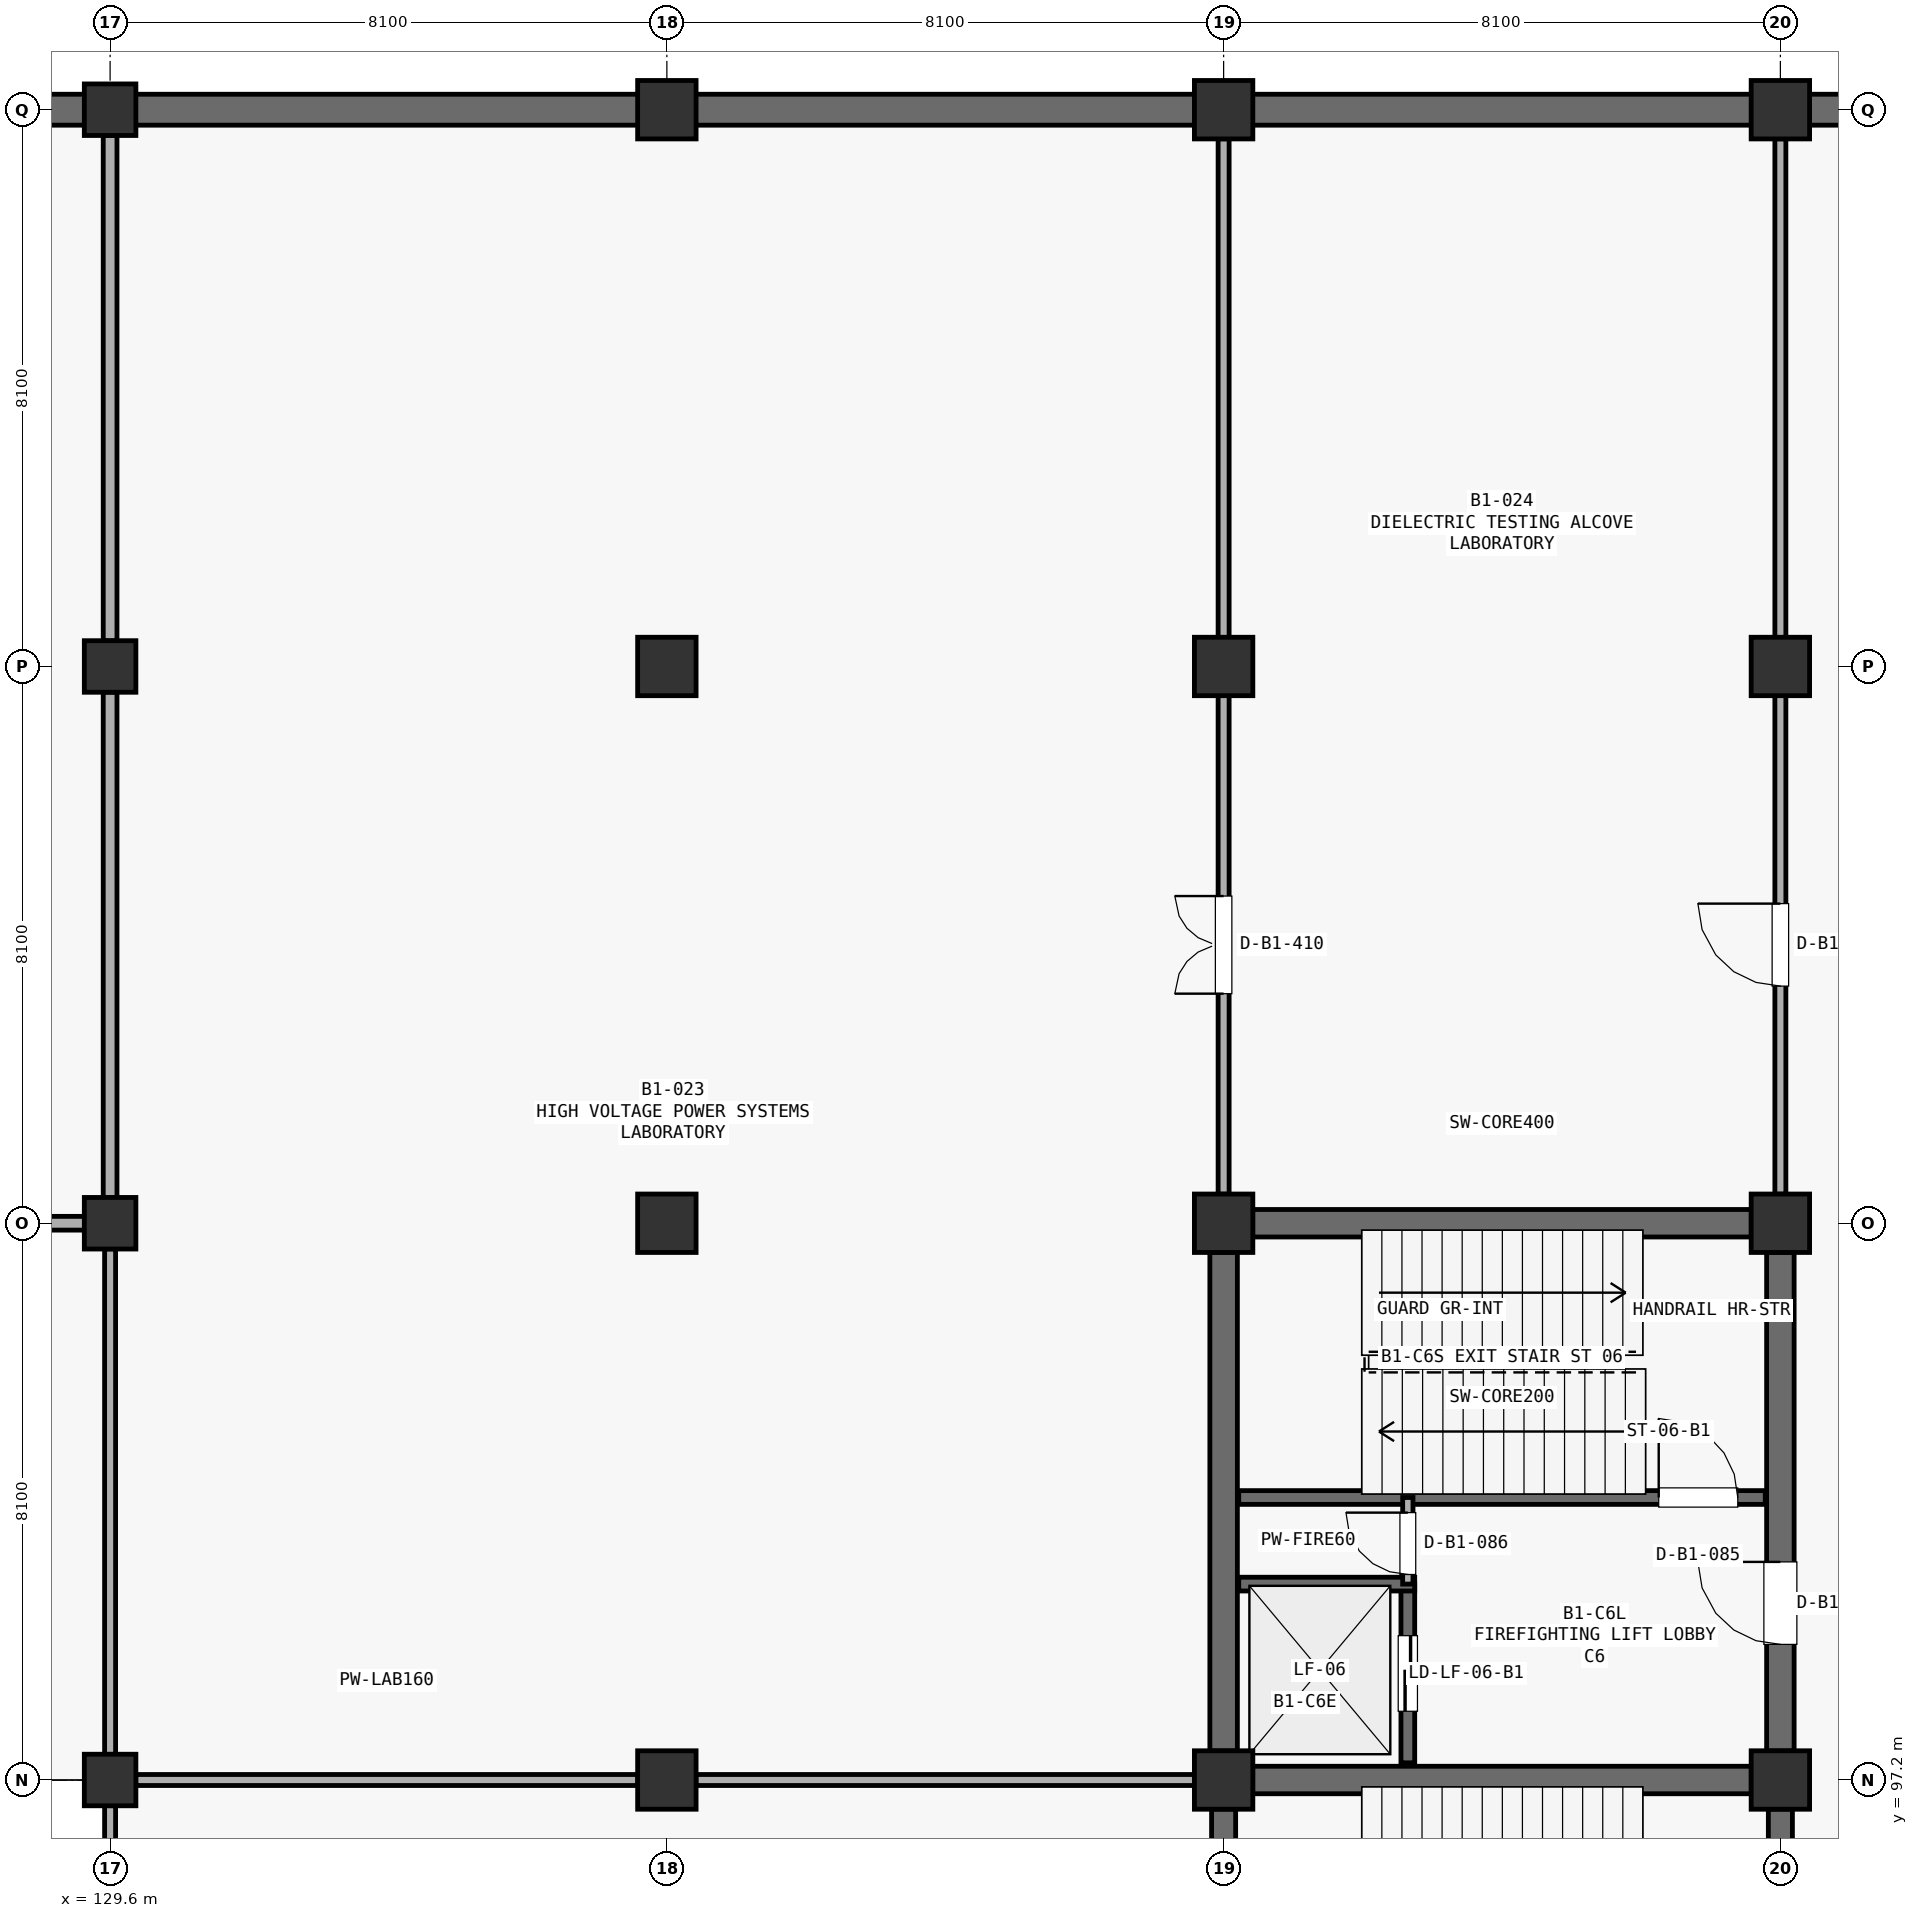
"""IFC4 building model, lengths in metres.
Left out: names, types, materials, properties, quantities, classifications, styles, units other than length and angle.
Written with IfcOpenShell. Run it as: python <this file> out.ifc"""

import sys

from ifc_helpers import new_model, si_unit, direction, frame, frame_2d, origin, origin_2d, place, context, subcontext, project, spatial, rectangle, extrude, element, fill, save


model = new_model("IFC4")
c1 = context("Model", 3, precision=1e-05, world=origin(), true_north=direction((0.0, 1.0)))
c2 = subcontext(c1, "Body", "Model", "MODEL_VIEW")
j1 = project(units=[si_unit("LENGTHUNIT", "METRE"), si_unit("PLANEANGLEUNIT", "RADIAN")], contexts=[c1])
p1 = place(None, origin())
s1 = spatial("IfcSite", under=j1, at=p1, CompositionType="ELEMENT")
p2 = place(p1, origin())
s2 = spatial("IfcBuilding", under=s1, at=p2, CompositionType="ELEMENT")
p3 = place(p2, frame((0.0, 0.0, -5.1)))
s3 = spatial("IfcBuildingStorey", under=s2, at=p3, CompositionType="ELEMENT", Elevation=-5.1)
for number, where, z_axis, x_axis in (
    (1, (129.6, 97.2, 0.0), (0.0, 0.0, 1.0), (1.0, 0.0, 0.0)),
    (2, (129.6, 105.3, 0.0), (0.0, 0.0, 1.0), (1.0, 0.0, 0.0)),
    (3, (129.6, 113.4, 0.0), (0.0, 0.0, 1.0), (1.0, 0.0, 0.0)),
    (4, (129.6, 121.5, 0.0), (0.0, 0.0, 1.0), (1.0, 0.0, 0.0)),
):
    element("IfcColumn", number, at=place(p3, frame(where, z_axis=z_axis, x_axis=x_axis)), inside=s3, PredefinedType="COLUMN", context=c2, shape_type="SweptSolid", body=[
        extrude(rectangle(XDim=0.75, YDim=0.75, at=origin_2d()), origin(), (0.0, 0.0, 1.0), 5.1),
    ])
for number, where, z_axis, x_axis in (
    (5, (137.7, 97.2, 0.0), (0.0, 0.0, 1.0), (1.0, 0.0, 0.0)),
    (6, (137.7, 105.3, 0.0), (0.0, 0.0, 1.0), (1.0, 0.0, 0.0)),
    (7, (137.7, 113.4, 0.0), (0.0, 0.0, 1.0), (1.0, 0.0, 0.0)),
    (8, (137.7, 121.5, 0.0), (0.0, 0.0, 1.0), (1.0, 0.0, 0.0)),
    (9, (145.8, 97.2, 0.0), (0.0, 0.0, 1.0), (1.0, 0.0, 0.0)),
    (10, (145.8, 105.3, 0.0), (0.0, 0.0, 1.0), (1.0, 0.0, 0.0)),
    (11, (145.8, 113.4, 0.0), (0.0, 0.0, 1.0), (1.0, 0.0, 0.0)),
    (12, (145.8, 121.5, 0.0), (0.0, 0.0, 1.0), (1.0, 0.0, 0.0)),
    (13, (153.9, 97.2, 0.0), (0.0, 0.0, 1.0), (1.0, 0.0, 0.0)),
    (14, (153.9, 105.3, 0.0), (0.0, 0.0, 1.0), (1.0, 0.0, 0.0)),
    (15, (153.9, 113.4, 0.0), (0.0, 0.0, 1.0), (1.0, 0.0, 0.0)),
    (16, (153.9, 121.5, 0.0), (0.0, 0.0, 1.0), (1.0, 0.0, 0.0)),
):
    element("IfcColumn", number, at=place(p3, frame(where, z_axis=z_axis, x_axis=x_axis)), inside=s3, PredefinedType="COLUMN", context=c2, shape_type="SweptSolid", body=[
        extrude(rectangle(XDim=0.85, YDim=0.85, at=origin_2d()), origin(), (0.0, 0.0, 1.0), 5.1),
    ])
p4 = place(p3, frame((121.86, 121.5, 0.0), z_axis=(0.0, 0.0, 1.0), x_axis=(1.0, 0.0, 0.0)))
e17 = element("IfcWall", 17, at=p4, inside=s3, PredefinedType="SOLIDWALL", context=c2, shape_type="SweptSolid", body=[
    extrude(rectangle(XDim=7.38, YDim=0.45, at=frame_2d((3.69, 0.0))), origin(), (0.0, 0.0, 1.0), 4.13),
])
p5 = place(p3, frame((129.96, 121.5, 0.0), z_axis=(0.0, 0.0, 1.0), x_axis=(1.0, 0.0, 0.0)))
e18 = element("IfcWall", 18, at=p5, inside=s3, PredefinedType="SOLIDWALL", context=c2, shape_type="SweptSolid", body=[
    extrude(rectangle(XDim=7.33, YDim=0.45, at=frame_2d((3.665, 0.0))), origin(), (0.0, 0.0, 1.0), 4.13),
])
p6 = place(p3, frame((138.11, 121.5, 0.0), z_axis=(0.0, 0.0, 1.0), x_axis=(1.0, 0.0, 0.0)))
e19 = element("IfcWall", 19, at=p6, inside=s3, PredefinedType="SOLIDWALL", context=c2, shape_type="SweptSolid", body=[
    extrude(rectangle(XDim=7.28, YDim=0.45, at=frame_2d((3.64, 0.0))), origin(), (0.0, 0.0, 1.0), 4.18),
])
p7 = place(p3, frame((146.21, 121.5, 0.0), z_axis=(0.0, 0.0, 1.0), x_axis=(1.0, 0.0, 0.0)))
e20 = element("IfcWall", 20, at=p7, inside=s3, PredefinedType="SOLIDWALL", context=c2, shape_type="SweptSolid", body=[
    extrude(rectangle(XDim=7.28, YDim=0.45, at=frame_2d((3.64, 0.0))), origin(), (0.0, 0.0, 1.0), 4.13),
])
p8 = place(p3, frame((154.31, 121.5, 0.0), z_axis=(0.0, 0.0, 1.0), x_axis=(1.0, 0.0, 0.0)))
e21 = element("IfcWall", 21, at=p8, inside=s3, PredefinedType="SOLIDWALL", context=c2, shape_type="SweptSolid", body=[
    extrude(rectangle(XDim=7.28, YDim=0.45, at=frame_2d((3.64, 0.0))), origin(), (0.0, 0.0, 1.0), 3.83),
])
p9 = place(p3, frame((146.223, 105.3, 0.0), z_axis=(0.0, 0.0, 1.0), x_axis=(1.0, 0.0, 0.0)))
e22 = element("IfcWall", 22, at=p9, inside=s3, PredefinedType="SHEAR", context=c2, shape_type="SweptSolid", body=[
    extrude(rectangle(XDim=7.254, YDim=0.4, at=frame_2d((3.627, 0.0))), origin(), (0.0, 0.0, 1.0), 4.782),
])
p10 = place(p3, frame((145.8, 97.623, 0.0), z_axis=(0.0, 0.0, 1.0), x_axis=(0.0, 1.0, 0.0)))
e23 = element("IfcWall", 23, at=p10, inside=s3, PredefinedType="SHEAR", context=c2, shape_type="SweptSolid", body=[
    extrude(rectangle(XDim=7.254, YDim=0.4, at=frame_2d((3.627, 0.0))), origin(), (0.0, 0.0, 1.0), 4.782),
])
p11 = place(p3, frame((153.9, 97.623, 0.0), z_axis=(0.0, 0.0, 1.0), x_axis=(0.0, 1.0, 0.0)))
e24 = element("IfcWall", 24, at=p11, inside=s3, PredefinedType="SHEAR", context=c2, shape_type="SweptSolid", body=[
    extrude(rectangle(XDim=7.254, YDim=0.4, at=frame_2d((3.627, 0.0))), origin(), (0.0, 0.0, 1.0), 4.782),
])
p12 = place(p11, frame((1.55, 0.0, 0.0)))
e25 = element("IfcOpeningElement", 25, at=p12, cuts=e24, PredefinedType="OPENING", context=c2, shape_type="SweptSolid", body=[
    extrude(rectangle(XDim=1.2, YDim=2.2, at=frame_2d((0.6, 1.1))), frame((0.0, 0.21, 0.0), z_axis=(0.0, -1.0, 0.0), x_axis=(1.0, 0.0, 0.0)), (0.0, 0.0, 1.0), 0.42),
])
p13 = place(p3, frame((146.223, 97.2, 0.0), z_axis=(0.0, 0.0, 1.0), x_axis=(1.0, 0.0, 0.0)))
e26 = element("IfcWall", 26, at=p13, inside=s3, PredefinedType="SHEAR", context=c2, shape_type="SweptSolid", body=[
    extrude(rectangle(XDim=7.254, YDim=0.4, at=frame_2d((3.627, 0.0))), origin(), (0.0, 0.0, 1.0), 4.782),
])
p14 = place(p3, frame((146.02, 101.31, 0.0), z_axis=(0.0, 0.0, 1.0), x_axis=(1.0, 0.0, 0.0)))
e27 = element("IfcWall", 27, at=p14, inside=s3, PredefinedType="SHEAR", context=c2, shape_type="SweptSolid", body=[
    extrude(rectangle(XDim=7.66, YDim=0.2, at=frame_2d((3.83, 0.0))), origin(), (0.0, 0.0, 1.0), 4.782),
])
p15 = place(p14, frame((6.11, 0.0, 0.0)))
e28 = element("IfcOpeningElement", 28, at=p15, cuts=e27, PredefinedType="OPENING", context=c2, shape_type="SweptSolid", body=[
    extrude(rectangle(XDim=1.15, YDim=2.2, at=frame_2d((0.575, 1.1))), frame((0.0, 0.11, 0.0), z_axis=(0.0, -1.0, 0.0), x_axis=(1.0, 0.0, 0.0)), (0.0, 0.0, 1.0), 0.22),
])
p16 = place(p3, frame((148.48, 97.45, 0.0), z_axis=(0.0, 0.0, 1.0), x_axis=(0.0, 1.0, 0.0)))
e29 = element("IfcWall", 29, at=p16, inside=s3, PredefinedType="SHEAR", context=c2, shape_type="SweptSolid", body=[
    extrude(rectangle(XDim=2.6, YDim=0.2, at=frame_2d((1.3, 0.0))), origin(), (0.0, 0.0, 1.0), 4.782),
])
p17 = place(p16, frame((0.75, 0.0, 0.0)))
e30 = element("IfcOpeningElement", 30, at=p17, cuts=e29, PredefinedType="OPENING", context=c2, shape_type="SweptSolid", body=[
    extrude(rectangle(XDim=1.1, YDim=2.2, at=frame_2d((0.55, 1.1))), frame((0.0, 0.11, 0.0), z_axis=(0.0, -1.0, 0.0), x_axis=(1.0, 0.0, 0.0)), (0.0, 0.0, 1.0), 0.22),
])
p18 = place(p3, frame((146.02, 100.05, 0.0), z_axis=(0.0, 0.0, 1.0), x_axis=(1.0, 0.0, 0.0)))
e31 = element("IfcWall", 31, at=p18, inside=s3, PredefinedType="SHEAR", context=c2, shape_type="SweptSolid", body=[
    extrude(rectangle(XDim=2.56, YDim=0.2, at=frame_2d((1.28, 0.0))), origin(), (0.0, 0.0, 1.0), 4.782),
])
p19 = place(p3, frame((148.48, 100.05, 0.0), z_axis=(0.0, 0.0, 1.0), x_axis=(0.0, 1.0, 0.0)))
e32 = element("IfcWall", 32, at=p19, inside=s3, PredefinedType="PARTITIONING", context=c2, shape_type="SweptSolid", body=[
    extrude(rectangle(XDim=1.26, YDim=0.15, at=frame_2d((0.63, 0.0))), origin(), (0.0, 0.0, 1.0), 4.782),
])
p20 = place(p19, frame((0.14, 0.0, 0.0)))
e33 = element("IfcOpeningElement", 33, at=p20, cuts=e32, PredefinedType="OPENING", context=c2, shape_type="SweptSolid", body=[
    extrude(rectangle(XDim=0.9, YDim=2.15, at=frame_2d((0.45, 1.075))), frame((0.0, 0.085, 0.0), z_axis=(0.0, -1.0, 0.0), x_axis=(1.0, 0.0, 0.0)), (0.0, 0.0, 1.0), 0.17),
])
p21 = place(p3, frame((145.8, 89.523, 0.0), z_axis=(0.0, 0.0, 1.0), x_axis=(0.0, 1.0, 0.0)))
e34 = element("IfcWall", 34, at=p21, inside=s3, PredefinedType="SHEAR", context=c2, shape_type="SweptSolid", body=[
    extrude(rectangle(XDim=7.254, YDim=0.35, at=frame_2d((3.627, 0.0))), origin(), (0.0, 0.0, 1.0), 4.782),
])
p22 = place(p3, frame((153.9, 89.523, 0.0), z_axis=(0.0, 0.0, 1.0), x_axis=(0.0, 1.0, 0.0)))
e35 = element("IfcWall", 35, at=p22, inside=s3, PredefinedType="SHEAR", context=c2, shape_type="SweptSolid", body=[
    extrude(rectangle(XDim=7.254, YDim=0.35, at=frame_2d((3.627, 0.0))), origin(), (0.0, 0.0, 1.0), 4.782),
])
p23 = place(p22, frame((1.55, 0.0, 0.0)))
e36 = element("IfcOpeningElement", 36, at=p23, cuts=e35, PredefinedType="OPENING", context=c2, shape_type="SweptSolid", body=[
    extrude(rectangle(XDim=1.2, YDim=2.2, at=frame_2d((0.6, 1.1))), frame((0.0, 0.185, 0.0), z_axis=(0.0, -1.0, 0.0), x_axis=(1.0, 0.0, 0.0)), (0.0, 0.0, 1.0), 0.37),
])
p24 = place(p3, frame((121.873, 105.3, 0.0), z_axis=(0.0, 0.0, 1.0), x_axis=(1.0, 0.0, 0.0)))
e37 = element("IfcWall", 37, at=p24, inside=s3, PredefinedType="PARTITIONING", context=c2, shape_type="SweptSolid", body=[
    extrude(rectangle(XDim=7.354, YDim=0.2, at=frame_2d((3.677, 0.0))), origin(), (0.0, 0.0, 1.0), 3.932),
])
p25 = place(p24, frame((2.977, 0.0, 0.0)))
e38 = element("IfcOpeningElement", 38, at=p25, cuts=e37, PredefinedType="OPENING", context=c2, shape_type="SweptSolid", body=[
    extrude(rectangle(XDim=1.4, YDim=2.2, at=frame_2d((0.7, 1.1))), frame((0.0, 0.11, 0.0), z_axis=(0.0, -1.0, 0.0), x_axis=(1.0, 0.0, 0.0)), (0.0, 0.0, 1.0), 0.22),
])
p26 = place(p3, frame((129.6, 105.673, 0.0), z_axis=(0.0, 0.0, 1.0), x_axis=(0.0, 1.0, 0.0)))
e39 = element("IfcWall", 39, at=p26, inside=s3, PredefinedType="PARTITIONING", context=c2, shape_type="SweptSolid", body=[
    extrude(rectangle(XDim=7.354, YDim=0.2, at=frame_2d((3.677, 0.0))), origin(), (0.0, 0.0, 1.0), 4.032),
])
p27 = place(p3, frame((129.6, 113.773, 0.0), z_axis=(0.0, 0.0, 1.0), x_axis=(0.0, 1.0, 0.0)))
e40 = element("IfcWall", 40, at=p27, inside=s3, PredefinedType="PARTITIONING", context=c2, shape_type="SweptSolid", body=[
    extrude(rectangle(XDim=7.354, YDim=0.2, at=frame_2d((3.677, 0.0))), origin(), (0.0, 0.0, 1.0), 4.132),
])
p28 = place(p3, frame((129.973, 97.2, 0.0), z_axis=(0.0, 0.0, 1.0), x_axis=(1.0, 0.0, 0.0)))
e41 = element("IfcWall", 41, at=p28, inside=s3, PredefinedType="PARTITIONING", context=c2, shape_type="SweptSolid", body=[
    extrude(rectangle(XDim=7.304, YDim=0.16, at=frame_2d((3.652, 0.0))), origin(), (0.0, 0.0, 1.0), 3.932),
])
p29 = place(p3, frame((138.123, 97.2, 0.0), z_axis=(0.0, 0.0, 1.0), x_axis=(1.0, 0.0, 0.0)))
e42 = element("IfcWall", 42, at=p29, inside=s3, PredefinedType="PARTITIONING", context=c2, shape_type="SweptSolid", body=[
    extrude(rectangle(XDim=7.254, YDim=0.16, at=frame_2d((3.627, 0.0))), origin(), (0.0, 0.0, 1.0), 3.832),
])
p30 = place(p3, frame((129.6, 89.423, 0.0), z_axis=(0.0, 0.0, 1.0), x_axis=(0.0, 1.0, 0.0)))
e43 = element("IfcWall", 43, at=p30, inside=s3, PredefinedType="PARTITIONING", context=c2, shape_type="SweptSolid", body=[
    extrude(rectangle(XDim=7.404, YDim=0.16, at=frame_2d((3.702, 0.0))), origin(), (0.0, 0.0, 1.0), 3.932),
])
p31 = place(p3, frame((145.8, 105.723, 0.0), z_axis=(0.0, 0.0, 1.0), x_axis=(0.0, 1.0, 0.0)))
e44 = element("IfcWall", 44, at=p31, inside=s3, PredefinedType="PARTITIONING", context=c2, shape_type="SweptSolid", body=[
    extrude(rectangle(XDim=7.254, YDim=0.16, at=frame_2d((3.627, 0.0))), origin(), (0.0, 0.0, 1.0), 3.832),
])
p32 = place(p31, frame((2.917, 0.0, 0.0)))
e45 = element("IfcOpeningElement", 45, at=p32, cuts=e44, PredefinedType="OPENING", context=c2, shape_type="SweptSolid", body=[
    extrude(rectangle(XDim=1.42, YDim=2.25, at=frame_2d((0.71, 1.125))), frame((0.0, 0.09, 0.0), z_axis=(0.0, -1.0, 0.0), x_axis=(1.0, 0.0, 0.0)), (0.0, 0.0, 1.0), 0.18),
])
p33 = place(p3, frame((145.8, 113.823, 0.0), z_axis=(0.0, 0.0, 1.0), x_axis=(0.0, 1.0, 0.0)))
e46 = element("IfcWall", 46, at=p33, inside=s3, PredefinedType="PARTITIONING", context=c2, shape_type="SweptSolid", body=[
    extrude(rectangle(XDim=7.254, YDim=0.16, at=frame_2d((3.627, 0.0))), origin(), (0.0, 0.0, 1.0), 4.032),
])
p34 = place(p3, frame((129.6, 97.573, 0.0), z_axis=(0.0, 0.0, 1.0), x_axis=(0.0, 1.0, 0.0)))
e47 = element("IfcWall", 47, at=p34, inside=s3, PredefinedType="PARTITIONING", context=c2, shape_type="SweptSolid", body=[
    extrude(rectangle(XDim=7.354, YDim=0.16, at=frame_2d((3.677, 0.0))), origin(), (0.0, 0.0, 1.0), 3.832),
])
p35 = place(p3, frame((153.9, 105.723, 0.0), z_axis=(0.0, 0.0, 1.0), x_axis=(0.0, 1.0, 0.0)))
e48 = element("IfcWall", 48, at=p35, inside=s3, PredefinedType="PARTITIONING", context=c2, shape_type="SweptSolid", body=[
    extrude(rectangle(XDim=7.254, YDim=0.16, at=frame_2d((3.627, 0.0))), origin(), (0.0, 0.0, 1.0), 4.132),
])
p36 = place(p35, frame((3.027, 0.0, 0.0)))
e49 = element("IfcOpeningElement", 49, at=p36, cuts=e48, PredefinedType="OPENING", context=c2, shape_type="SweptSolid", body=[
    extrude(rectangle(XDim=1.2, YDim=2.2, at=frame_2d((0.6, 1.1))), frame((0.0, 0.09, 0.0), z_axis=(0.0, -1.0, 0.0), x_axis=(1.0, 0.0, 0.0)), (0.0, 0.0, 1.0), 0.18),
])
p37 = place(p3, frame((153.9, 113.823, 0.0), z_axis=(0.0, 0.0, 1.0), x_axis=(0.0, 1.0, 0.0)))
e50 = element("IfcWall", 50, at=p37, inside=s3, PredefinedType="PARTITIONING", context=c2, shape_type="SweptSolid", body=[
    extrude(rectangle(XDim=7.254, YDim=0.16, at=frame_2d((3.627, 0.0))), origin(), (0.0, 0.0, 1.0), 4.182),
])
p38 = place(p12, origin())
e51 = element("IfcDoor", 51, at=p38, inside=s3, OperationType="SINGLE_SWING_RIGHT", PredefinedType="DOOR", context=c2, shape_type="SweptSolid", body=[
    extrude(rectangle(XDim=1.2, YDim=2.2, at=frame_2d((0.6, 1.1))), frame((0.0, 0.025, 0.0), z_axis=(0.0, -1.0, 0.0), x_axis=(1.0, 0.0, 0.0)), (0.0, 0.0, 1.0), 0.05),
])
fill(e25, e51)
p39 = place(p15, origin())
e52 = element("IfcDoor", 52, at=p39, inside=s3, OperationType="SINGLE_SWING_LEFT", PredefinedType="DOOR", context=c2, shape_type="SweptSolid", body=[
    extrude(rectangle(XDim=1.15, YDim=2.2, at=frame_2d((0.575, 1.1))), frame((0.0, 0.025, 0.0), z_axis=(0.0, -1.0, 0.0), x_axis=(1.0, 0.0, 0.0)), (0.0, 0.0, 1.0), 0.05),
])
fill(e28, e52)
p40 = place(p17, origin())
e53 = element("IfcDoor", 53, at=p40, inside=s3, OperationType="SLIDING_TO_LEFT", PredefinedType="DOOR", context=c2, shape_type="SweptSolid", body=[
    extrude(rectangle(XDim=1.1, YDim=2.2, at=frame_2d((0.55, 1.1))), frame((0.0, 0.025, 0.0), z_axis=(0.0, -1.0, 0.0), x_axis=(1.0, 0.0, 0.0)), (0.0, 0.0, 1.0), 0.05),
])
fill(e30, e53)
p41 = place(p20, origin())
e54 = element("IfcDoor", 54, at=p41, inside=s3, OperationType="SINGLE_SWING_RIGHT", PredefinedType="DOOR", context=c2, shape_type="SweptSolid", body=[
    extrude(rectangle(XDim=0.9, YDim=2.15, at=frame_2d((0.45, 1.075))), frame((0.0, 0.025, 0.0), z_axis=(0.0, -1.0, 0.0), x_axis=(1.0, 0.0, 0.0)), (0.0, 0.0, 1.0), 0.05),
])
fill(e33, e54)
p42 = place(p32, origin())
e55 = element("IfcDoor", 55, at=p42, inside=s3, OperationType="DOUBLE_SWING_LEFT", PredefinedType="DOOR", context=c2, shape_type="SweptSolid", body=[
    extrude(rectangle(XDim=1.42, YDim=2.25, at=frame_2d((0.71, 1.125))), frame((0.0, 0.025, 0.0), z_axis=(0.0, -1.0, 0.0), x_axis=(1.0, 0.0, 0.0)), (0.0, 0.0, 1.0), 0.05),
])
fill(e45, e55)
p43 = place(p36, origin())
e56 = element("IfcDoor", 56, at=p43, inside=s3, OperationType="SINGLE_SWING_RIGHT", PredefinedType="DOOR", context=c2, shape_type="SweptSolid", body=[
    extrude(rectangle(XDim=1.2, YDim=2.2, at=frame_2d((0.6, 1.1))), frame((0.0, 0.025, 0.0), z_axis=(0.0, -1.0, 0.0), x_axis=(1.0, 0.0, 0.0)), (0.0, 0.0, 1.0), 0.05),
])
fill(e49, e56)
save(model, sys.argv[1])
